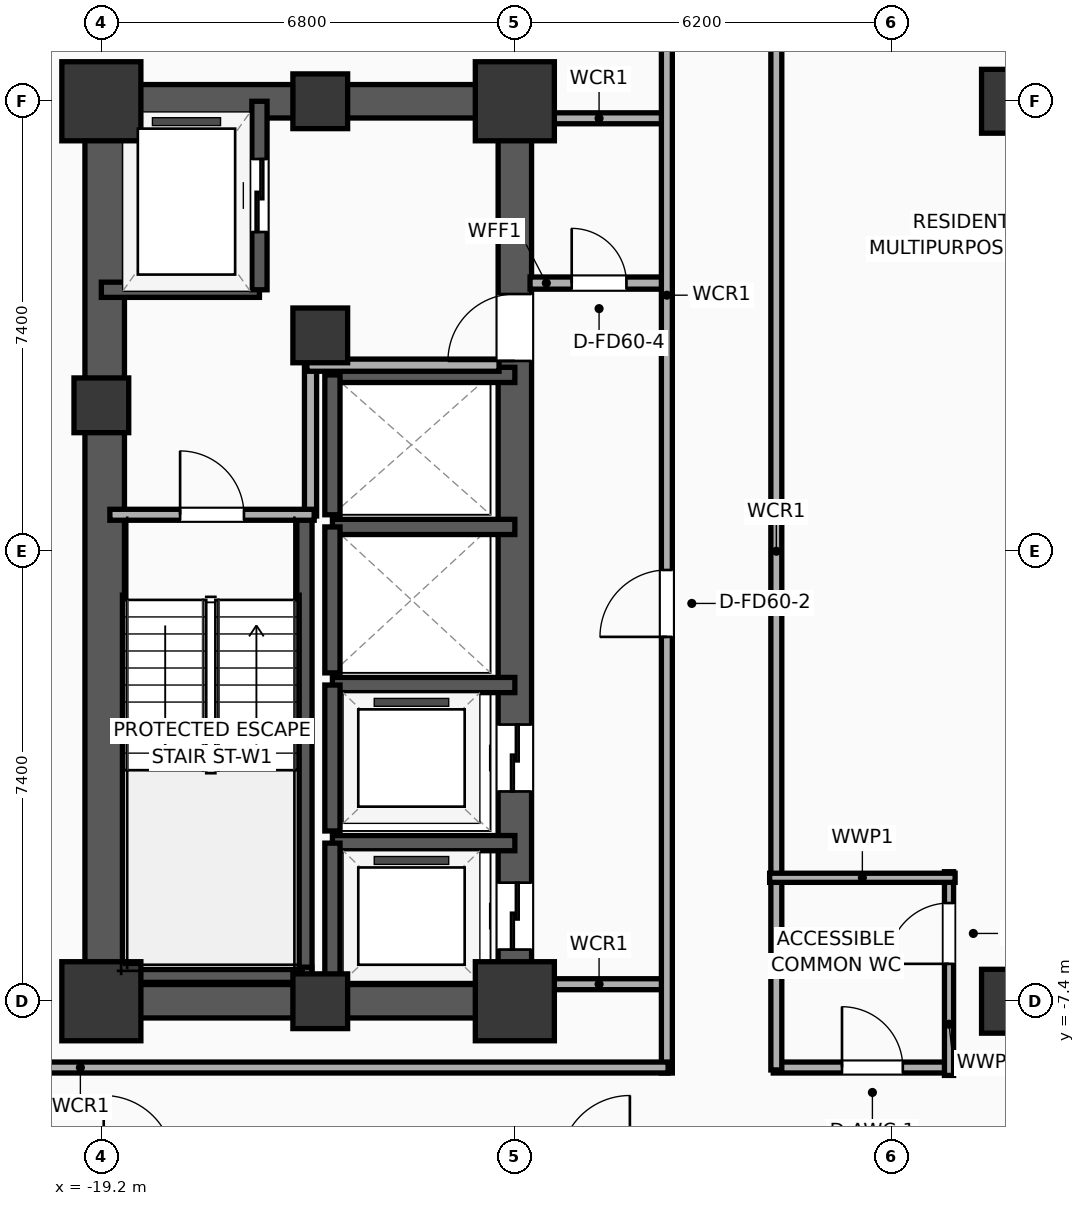
"""IFC4 building model, lengths in metres.
Left out: names, types, materials, properties, quantities, classifications, styles, units other than length and angle.
Written with IfcOpenShell. Run it as: python <this file> out.ifc"""

import sys

from ifc_helpers import new_model, si_unit, direction, frame, frame_2d, origin, origin_2d, place, context, subcontext, project, spatial, rectangle, extrude, element, fill, save


model = new_model("IFC4")
c1 = context("Model", 3, precision=1e-05, world=origin(), true_north=direction((0.0, 1.0)))
c2 = subcontext(c1, "Body", "Model", "MODEL_VIEW")
j1 = project(units=[si_unit("LENGTHUNIT", "METRE"), si_unit("PLANEANGLEUNIT", "RADIAN")], contexts=[c1])
p1 = place(None, origin())
s1 = spatial("IfcSite", under=j1, at=p1, CompositionType="ELEMENT")
p2 = place(p1, origin())
s2 = spatial("IfcBuilding", under=s1, at=p2, CompositionType="ELEMENT")
p3 = place(p2, frame((0.0, 0.0, 113.1)))
s3 = spatial("IfcBuildingStorey", under=s2, at=p3, CompositionType="ELEMENT", Elevation=113.1)
p4 = place(p3, frame((-19.2, -7.4, 0.0), z_axis=(0.0, 0.0, 1.0), x_axis=(1.0, 0.0, 0.0)))
e1 = element("IfcColumn", 1, at=p4, inside=s3, PredefinedType="COLUMN", context=c2, shape_type="SweptSolid", body=[
    extrude(rectangle(XDim=1.3, YDim=1.3, at=origin_2d()), origin(), (0.0, 0.0, 1.0), 3.9),
])
p5 = place(p3, frame((-19.2, 2.4, 0.0), z_axis=(0.0, 0.0, 1.0), x_axis=(1.0, 0.0, 0.0)))
e2 = element("IfcColumn", 2, at=p5, inside=s3, PredefinedType="COLUMN", context=c2, shape_type="SweptSolid", body=[
    extrude(rectangle(XDim=0.9, YDim=0.9, at=origin_2d()), origin(), (0.0, 0.0, 1.0), 3.9),
])
p6 = place(p3, frame((-19.2, 7.4, 0.0), z_axis=(0.0, 0.0, 1.0), x_axis=(1.0, 0.0, 0.0)))
e3 = element("IfcColumn", 3, at=p6, inside=s3, PredefinedType="COLUMN", context=c2, shape_type="SweptSolid", body=[
    extrude(rectangle(XDim=1.3, YDim=1.3, at=origin_2d()), origin(), (0.0, 0.0, 1.0), 3.9),
])
for number, where, z_axis, x_axis in (
    (4, (-15.6, -7.4, 0.0), (0.0, 0.0, 1.0), (1.0, 0.0, 0.0)),
    (5, (-15.6, 7.4, 0.0), (0.0, 0.0, 1.0), (1.0, 0.0, 0.0)),
):
    element("IfcColumn", number, at=place(p3, frame(where, z_axis=z_axis, x_axis=x_axis)), inside=s3, PredefinedType="COLUMN", context=c2, shape_type="SweptSolid", body=[
        extrude(rectangle(XDim=0.9, YDim=0.9, at=origin_2d()), origin(), (0.0, 0.0, 1.0), 3.9),
    ])
p7 = place(p3, frame((-12.4, -7.4, 0.0), z_axis=(0.0, 0.0, 1.0), x_axis=(1.0, 0.0, 0.0)))
e6 = element("IfcColumn", 6, at=p7, inside=s3, PredefinedType="COLUMN", context=c2, shape_type="SweptSolid", body=[
    extrude(rectangle(XDim=1.3, YDim=1.3, at=origin_2d()), origin(), (0.0, 0.0, 1.0), 3.9),
])
p8 = place(p3, frame((-15.6, 3.55, 0.0), z_axis=(0.0, 0.0, 1.0), x_axis=(1.0, 0.0, 0.0)))
e7 = element("IfcColumn", 7, at=p8, inside=s3, PredefinedType="COLUMN", context=c2, shape_type="SweptSolid", body=[
    extrude(rectangle(XDim=0.9, YDim=0.9, at=origin_2d()), origin(), (0.0, 0.0, 1.0), 3.9),
])
p9 = place(p3, frame((-12.4, 7.4, 0.0), z_axis=(0.0, 0.0, 1.0), x_axis=(1.0, 0.0, 0.0)))
e8 = element("IfcColumn", 8, at=p9, inside=s3, PredefinedType="COLUMN", context=c2, shape_type="SweptSolid", body=[
    extrude(rectangle(XDim=1.3, YDim=1.3, at=origin_2d()), origin(), (0.0, 0.0, 1.0), 3.9),
])
for number, where, z_axis, x_axis in (
    (9, (-19.475, -7.4, 0.0), (0.0, 0.0, 1.0), (1.0, 0.0, 0.0)),
    (10, (-19.475, 7.4, 0.0), (0.0, 0.0, 1.0), (1.0, 0.0, 0.0)),
):
    element("IfcWall", number, at=place(p3, frame(where, z_axis=z_axis, x_axis=x_axis)), inside=s3, PredefinedType="SHEAR", context=c2, shape_type="SweptSolid", body=[
        extrude(rectangle(XDim=7.35, YDim=0.55, at=frame_2d((3.675, 0.0))), origin(), (0.0, 0.0, 1.0), 3.65),
    ])
p10 = place(p3, frame((-19.145, -7.4, 0.0), z_axis=(0.0, 0.0, 1.0), x_axis=(0.0, 1.0, 0.0)))
e11 = element("IfcWall", 11, at=p10, inside=s3, PredefinedType="SHEAR", context=c2, shape_type="SweptSolid", body=[
    extrude(rectangle(XDim=14.8, YDim=0.65, at=frame_2d((7.4, 0.0))), origin(), (0.0, 0.0, 1.0), 3.65),
])
p11 = place(p3, frame((-12.4, -7.4, 0.0), z_axis=(0.0, 0.0, 1.0), x_axis=(0.0, 1.0, 0.0)))
e12 = element("IfcWall", 12, at=p11, inside=s3, PredefinedType="SHEAR", context=c2, shape_type="SweptSolid", body=[
    extrude(rectangle(XDim=14.8, YDim=0.55, at=frame_2d((7.4, 0.0))), origin(), (0.0, 0.0, 1.0), 3.65),
])
p12 = place(p11, frame((0.85, 0.0, 0.0)))
e13 = element("IfcOpeningElement", 13, at=p12, cuts=e12, PredefinedType="OPENING", context=c2, shape_type="SweptSolid", body=[
    extrude(rectangle(XDim=1.1, YDim=2.05, at=frame_2d((0.55, 1.025))), frame((0.0, 0.285, 0.0), z_axis=(0.0, -1.0, 0.0), x_axis=(1.0, 0.0, 0.0)), (0.0, 0.0, 1.0), 0.57),
])
p13 = place(p11, frame((3.45, 0.0, 0.0)))
e14 = element("IfcOpeningElement", 14, at=p13, cuts=e12, PredefinedType="OPENING", context=c2, shape_type="SweptSolid", body=[
    extrude(rectangle(XDim=1.1, YDim=2.05, at=frame_2d((0.55, 1.025))), frame((0.0, 0.285, 0.0), z_axis=(0.0, -1.0, 0.0), x_axis=(1.0, 0.0, 0.0)), (0.0, 0.0, 1.0), 0.57),
])
p14 = place(p11, frame((10.53, 0.0, 0.0)))
e15 = element("IfcOpeningElement", 15, at=p14, cuts=e12, PredefinedType="OPENING", context=c2, shape_type="SweptSolid", body=[
    extrude(rectangle(XDim=1.1, YDim=2.05, at=frame_2d((0.55, 1.025))), frame((0.0, 0.285, 0.0), z_axis=(0.0, -1.0, 0.0), x_axis=(1.0, 0.0, 0.0)), (0.0, 0.0, 1.0), 0.57),
])
p15 = place(p3, frame((-15.86, -7.085, 0.0), z_axis=(0.0, 0.0, 1.0), x_axis=(0.0, 1.0, 0.0)))
e16 = element("IfcWall", 16, at=p15, inside=s3, PredefinedType="SOLIDWALL", context=c2, shape_type="SweptSolid", body=[
    extrude(rectangle(XDim=7.685, YDim=0.25, at=frame_2d((3.843, 0.0))), origin(), (0.0, 0.0, 1.0), 3.65),
])
p16 = place(p3, frame((-19.2, -6.965, 0.0), z_axis=(0.0, 0.0, 1.0), x_axis=(1.0, 0.0, 0.0)))
e17 = element("IfcWall", 17, at=p16, inside=s3, PredefinedType="SOLIDWALL", context=c2, shape_type="SweptSolid", body=[
    extrude(rectangle(XDim=3.46, YDim=0.25, at=frame_2d((1.73, 0.0))), origin(), (0.0, 0.0, 1.0), 3.65),
])
for number, where, z_axis, x_axis in (
    (18, (-4.2, -7.4, 0.0), (0.0, 0.0, 1.0), (1.0, 0.0, 0.0)),
    (19, (-4.2, 7.4, 0.0), (0.0, 0.0, 1.0), (1.0, 0.0, 0.0)),
):
    element("IfcColumn", number, at=place(p3, frame(where, z_axis=z_axis, x_axis=x_axis)), inside=s3, PredefinedType="COLUMN", context=c2, shape_type="SweptSolid", body=[
        extrude(rectangle(XDim=1.05, YDim=1.05, at=origin_2d()), origin(), (0.0, 0.0, 1.0), 3.9),
    ])
p17 = place(p3, frame((-19.2, 4.3, 0.0), z_axis=(0.0, 0.0, 1.0), x_axis=(1.0, 0.0, 0.0)))
e20 = element("IfcWall", 20, at=p17, inside=s3, PredefinedType="SOLIDWALL", context=c2, shape_type="SweptSolid", body=[
    extrude(rectangle(XDim=2.6, YDim=0.25, at=frame_2d((1.3, 0.0))), origin(), (0.0, 0.0, 1.0), 3.65),
])
p18 = place(p3, frame((-16.6, 4.3, 0.0), z_axis=(0.0, 0.0, 1.0), x_axis=(0.0, 1.0, 0.0)))
e21 = element("IfcWall", 21, at=p18, inside=s3, PredefinedType="SOLIDWALL", context=c2, shape_type="SweptSolid", body=[
    extrude(rectangle(XDim=3.1, YDim=0.25, at=frame_2d((1.55, 0.0))), origin(), (0.0, 0.0, 1.0), 3.65),
])
p19 = place(p18, frame((0.95, 0.0, 0.0)))
e22 = element("IfcOpeningElement", 22, at=p19, cuts=e21, PredefinedType="OPENING", context=c2, shape_type="SweptSolid", body=[
    extrude(rectangle(XDim=1.2, YDim=2.05, at=frame_2d((0.6, 1.025))), frame((0.0, 0.135, 0.0), z_axis=(0.0, -1.0, 0.0), x_axis=(1.0, 0.0, 0.0)), (0.0, 0.0, 1.0), 0.27),
])
p20 = place(p3, frame((-12.4, -4.8, 0.0), z_axis=(0.0, 0.0, 1.0), x_axis=(-1.0, 0.0, 0.0)))
e23 = element("IfcWall", 23, at=p20, inside=s3, PredefinedType="SOLIDWALL", context=c2, shape_type="SweptSolid", body=[
    extrude(rectangle(XDim=3.0, YDim=0.25, at=frame_2d((1.5, 0.0))), origin(), (0.0, 0.0, 1.0), 3.65),
])
p21 = place(p3, frame((-15.4, -4.8, 0.0), z_axis=(0.0, 0.0, 1.0), x_axis=(0.0, -1.0, 0.0)))
e24 = element("IfcWall", 24, at=p21, inside=s3, PredefinedType="SOLIDWALL", context=c2, shape_type="SweptSolid", body=[
    extrude(rectangle(XDim=2.6, YDim=0.25, at=frame_2d((1.3, 0.0))), origin(), (0.0, 0.0, 1.0), 3.65),
])
p22 = place(p3, frame((-12.4, -2.2, 0.0), z_axis=(0.0, 0.0, 1.0), x_axis=(-1.0, 0.0, 0.0)))
e25 = element("IfcWall", 25, at=p22, inside=s3, PredefinedType="SOLIDWALL", context=c2, shape_type="SweptSolid", body=[
    extrude(rectangle(XDim=3.0, YDim=0.25, at=frame_2d((1.5, 0.0))), origin(), (0.0, 0.0, 1.0), 3.65),
])
p23 = place(p3, frame((-15.4, -2.2, 0.0), z_axis=(0.0, 0.0, 1.0), x_axis=(0.0, -1.0, 0.0)))
e26 = element("IfcWall", 26, at=p23, inside=s3, PredefinedType="SOLIDWALL", context=c2, shape_type="SweptSolid", body=[
    extrude(rectangle(XDim=2.4, YDim=0.25, at=frame_2d((1.2, 0.0))), origin(), (0.0, 0.0, 1.0), 3.65),
])
p24 = place(p3, frame((-12.4, 0.4, 0.0), z_axis=(0.0, 0.0, 1.0), x_axis=(-1.0, 0.0, 0.0)))
e27 = element("IfcWall", 27, at=p24, inside=s3, PredefinedType="SOLIDWALL", context=c2, shape_type="SweptSolid", body=[
    extrude(rectangle(XDim=3.0, YDim=0.25, at=frame_2d((1.5, 0.0))), origin(), (0.0, 0.0, 1.0), 3.65),
])
p25 = place(p3, frame((-15.4, 0.4, 0.0), z_axis=(0.0, 0.0, 1.0), x_axis=(0.0, -1.0, 0.0)))
e28 = element("IfcWall", 28, at=p25, inside=s3, PredefinedType="SOLIDWALL", context=c2, shape_type="SweptSolid", body=[
    extrude(rectangle(XDim=2.4, YDim=0.25, at=frame_2d((1.2, 0.0))), origin(), (0.0, 0.0, 1.0), 3.65),
])
p26 = place(p3, frame((-12.4, 2.9, 0.0), z_axis=(0.0, 0.0, 1.0), x_axis=(-1.0, 0.0, 0.0)))
e29 = element("IfcWall", 29, at=p26, inside=s3, PredefinedType="SOLIDWALL", context=c2, shape_type="SweptSolid", body=[
    extrude(rectangle(XDim=3.0, YDim=0.25, at=frame_2d((1.5, 0.0))), origin(), (0.0, 0.0, 1.0), 3.65),
])
p27 = place(p3, frame((-15.4, 2.9, 0.0), z_axis=(0.0, 0.0, 1.0), x_axis=(0.0, -1.0, 0.0)))
e30 = element("IfcWall", 30, at=p27, inside=s3, PredefinedType="SOLIDWALL", context=c2, shape_type="SweptSolid", body=[
    extrude(rectangle(XDim=2.3, YDim=0.25, at=frame_2d((1.15, 0.0))), origin(), (0.0, 0.0, 1.0), 3.65),
])
p28 = place(p3, frame((-15.76, 0.58, 0.0), z_axis=(0.0, 0.0, 1.0), x_axis=(0.0, 1.0, 0.0)))
e31 = element("IfcWall", 31, at=p28, inside=s3, PredefinedType="PARTITIONING", context=c2, shape_type="SweptSolid", body=[
    extrude(rectangle(XDim=2.52, YDim=0.2, at=frame_2d((1.26, 0.0))), origin(), (0.0, 0.0, 1.0), 3.65),
])
p29 = place(p3, frame((-15.82, 3.06, 0.0), z_axis=(0.0, 0.0, 1.0), x_axis=(1.0, 0.0, 0.0)))
e32 = element("IfcWall", 32, at=p29, inside=s3, PredefinedType="PARTITIONING", context=c2, shape_type="SweptSolid", body=[
    extrude(rectangle(XDim=3.16, YDim=0.2, at=frame_2d((1.58, 0.0))), origin(), (0.0, 0.0, 1.0), 3.65),
])
p30 = place(p3, frame((-19.06, 0.6, 0.0), z_axis=(0.0, 0.0, 1.0), x_axis=(1.0, 0.0, 0.0)))
e33 = element("IfcWall", 33, at=p30, inside=s3, PredefinedType="PARTITIONING", context=c2, shape_type="SweptSolid", body=[
    extrude(rectangle(XDim=3.36, YDim=0.18, at=frame_2d((1.68, 0.0))), origin(), (0.0, 0.0, 1.0), 3.65),
])
p31 = place(p30, frame((1.155, 0.0, 0.0)))
e34 = element("IfcOpeningElement", 34, at=p31, cuts=e33, PredefinedType="OPENING", context=c2, shape_type="SweptSolid", body=[
    extrude(rectangle(XDim=1.05, YDim=2.05, at=frame_2d((0.525, 1.025))), frame((0.0, 0.1, 0.0), z_axis=(0.0, -1.0, 0.0), x_axis=(1.0, 0.0, 0.0)), (0.0, 0.0, 1.0), 0.2),
])
p32 = place(p3, frame((-12.15, 4.41, 0.0), z_axis=(0.0, 0.0, 1.0), x_axis=(1.0, 0.0, 0.0)))
e35 = element("IfcWall", 35, at=p32, inside=s3, PredefinedType="PARTITIONING", context=c2, shape_type="SweptSolid", body=[
    extrude(rectangle(XDim=2.27, YDim=0.2, at=frame_2d((1.135, 0.0))), origin(), (0.0, 0.0, 1.0), 3.65),
])
p33 = place(p32, frame((0.685, 0.0, 0.0)))
e36 = element("IfcOpeningElement", 36, at=p33, cuts=e35, PredefinedType="OPENING", context=c2, shape_type="SweptSolid", body=[
    extrude(rectangle(XDim=0.9, YDim=2.05, at=frame_2d((0.45, 1.025))), frame((0.0, 0.11, 0.0), z_axis=(0.0, -1.0, 0.0), x_axis=(1.0, 0.0, 0.0)), (0.0, 0.0, 1.0), 0.22),
])
for number, where, z_axis, x_axis in (
    (37, (-12.15, 7.12, 0.0), (0.0, 0.0, 1.0), (1.0, 0.0, 0.0)),
    (38, (-12.15, -7.12, 0.0), (0.0, 0.0, 1.0), (1.0, 0.0, 0.0)),
):
    element("IfcWall", number, at=place(p3, frame(where, z_axis=z_axis, x_axis=x_axis)), inside=s3, PredefinedType="PARTITIONING", context=c2, shape_type="SweptSolid", body=[
        extrude(rectangle(XDim=2.27, YDim=0.18, at=frame_2d((1.135, 0.0))), origin(), (0.0, 0.0, 1.0), 3.65),
    ])
p34 = place(p3, frame((-9.9, -8.58, 0.0), z_axis=(0.0, 0.0, 1.0), x_axis=(0.0, 1.0, 0.0)))
e39 = element("IfcWall", 39, at=p34, inside=s3, PredefinedType="PARTITIONING", context=c2, shape_type="SweptSolid", body=[
    extrude(rectangle(XDim=17.16, YDim=0.18, at=frame_2d((8.58, 0.0))), origin(), (0.0, 0.0, 1.0), 3.65),
])
p35 = place(p34, frame((7.172, 0.0, 0.0)))
e40 = element("IfcOpeningElement", 40, at=p35, cuts=e39, PredefinedType="OPENING", context=c2, shape_type="SweptSolid", body=[
    extrude(rectangle(XDim=1.1, YDim=2.05, at=frame_2d((0.55, 1.025))), frame((0.0, 0.1, 0.0), z_axis=(0.0, -1.0, 0.0), x_axis=(1.0, 0.0, 0.0)), (0.0, 0.0, 1.0), 0.2),
])
p36 = place(p3, frame((-29.21, -8.49, 0.0), z_axis=(0.0, 0.0, 1.0), x_axis=(1.0, 0.0, 0.0)))
e41 = element("IfcWall", 41, at=p36, inside=s3, PredefinedType="PARTITIONING", context=c2, shape_type="SweptSolid", body=[
    extrude(rectangle(XDim=19.33, YDim=0.18, at=frame_2d((9.665, 0.0))), origin(), (0.0, 0.0, 1.0), 3.65),
])
p37 = place(p3, frame((-8.15, -8.49, 0.0), z_axis=(0.0, 0.0, 1.0), x_axis=(1.0, 0.0, 0.0)))
e42 = element("IfcWall", 42, at=p37, inside=s3, PredefinedType="PARTITIONING", context=c2, shape_type="SweptSolid", body=[
    extrude(rectangle(XDim=16.3, YDim=0.18, at=frame_2d((8.15, 0.0))), origin(), (0.0, 0.0, 1.0), 3.65),
])
p38 = place(p37, frame((1.13, 0.0, 0.0)))
e43 = element("IfcOpeningElement", 43, at=p38, cuts=e42, PredefinedType="OPENING", context=c2, shape_type="SweptSolid", body=[
    extrude(rectangle(XDim=1.0, YDim=2.05, at=frame_2d((0.5, 1.025))), frame((0.0, 0.1, 0.0), z_axis=(0.0, -1.0, 0.0), x_axis=(1.0, 0.0, 0.0)), (0.0, 0.0, 1.0), 0.2),
])
p39 = place(p37, frame((10.12, 0.0, 0.0)))
e44 = element("IfcOpeningElement", 44, at=p39, cuts=e42, PredefinedType="OPENING", context=c2, shape_type="SweptSolid", body=[
    extrude(rectangle(XDim=0.95, YDim=2.05, at=frame_2d((0.475, 1.025))), frame((0.0, 0.1, 0.0), z_axis=(0.0, -1.0, 0.0), x_axis=(1.0, 0.0, 0.0)), (0.0, 0.0, 1.0), 0.2),
])
p40 = place(p3, frame((-8.1, -8.53, 0.0), z_axis=(0.0, 0.0, 1.0), x_axis=(0.0, 1.0, 0.0)))
e45 = element("IfcWall", 45, at=p40, inside=s3, PredefinedType="PARTITIONING", context=c2, shape_type="SweptSolid", body=[
    extrude(rectangle(XDim=17.06, YDim=0.18, at=frame_2d((8.53, 0.0))), origin(), (0.0, 0.0, 1.0), 3.65),
])
p41 = place(p3, frame((-5.26, -8.62, 0.0), z_axis=(0.0, 0.0, 1.0), x_axis=(0.0, 1.0, 0.0)))
e46 = element("IfcWall", 46, at=p41, inside=s3, PredefinedType="PLUMBINGWALL", context=c2, shape_type="SweptSolid", body=[
    extrude(rectangle(XDim=3.35, YDim=0.15, at=frame_2d((1.675, 0.0))), origin(), (0.0, 0.0, 1.0), 3.65),
])
p42 = place(p41, frame((1.835, 0.0, 0.0)))
e47 = element("IfcOpeningElement", 47, at=p42, cuts=e46, PredefinedType="OPENING", context=c2, shape_type="SweptSolid", body=[
    extrude(rectangle(XDim=1.0, YDim=2.05, at=frame_2d((0.5, 1.025))), frame((0.0, 0.085, 0.0), z_axis=(0.0, -1.0, 0.0), x_axis=(1.0, 0.0, 0.0)), (0.0, 0.0, 1.0), 0.17),
])
p43 = place(p3, frame((-8.21, -5.37, 0.0), z_axis=(0.0, 0.0, 1.0), x_axis=(1.0, 0.0, 0.0)))
e48 = element("IfcWall", 48, at=p43, inside=s3, PredefinedType="PLUMBINGWALL", context=c2, shape_type="SweptSolid", body=[
    extrude(rectangle(XDim=3.05, YDim=0.15, at=frame_2d((1.525, 0.0))), origin(), (0.0, 0.0, 1.0), 3.65),
])
p44 = place(p19, origin())
e49 = element("IfcDoor", 49, at=p44, inside=s3, OperationType="SLIDING_TO_LEFT", PredefinedType="DOOR", context=c2, shape_type="SweptSolid", body=[
    extrude(rectangle(XDim=1.2, YDim=2.05, at=frame_2d((0.6, 1.025))), frame((0.0, 0.025, 0.0), z_axis=(0.0, -1.0, 0.0), x_axis=(1.0, 0.0, 0.0)), (0.0, 0.0, 1.0), 0.05),
])
fill(e22, e49)
p45 = place(p12, origin())
e50 = element("IfcDoor", 50, at=p45, inside=s3, OperationType="SLIDING_TO_LEFT", PredefinedType="DOOR", context=c2, shape_type="SweptSolid", body=[
    extrude(rectangle(XDim=1.1, YDim=2.05, at=frame_2d((0.55, 1.025))), frame((0.0, 0.025, 0.0), z_axis=(0.0, -1.0, 0.0), x_axis=(1.0, 0.0, 0.0)), (0.0, 0.0, 1.0), 0.05),
])
fill(e13, e50)
p46 = place(p13, origin())
e51 = element("IfcDoor", 51, at=p46, inside=s3, OperationType="SLIDING_TO_LEFT", PredefinedType="DOOR", context=c2, shape_type="SweptSolid", body=[
    extrude(rectangle(XDim=1.1, YDim=2.05, at=frame_2d((0.55, 1.025))), frame((0.0, 0.025, 0.0), z_axis=(0.0, -1.0, 0.0), x_axis=(1.0, 0.0, 0.0)), (0.0, 0.0, 1.0), 0.05),
])
fill(e14, e51)
p47 = place(p31, origin())
e52 = element("IfcDoor", 52, at=p47, inside=s3, OperationType="SINGLE_SWING_LEFT", PredefinedType="DOOR", context=c2, shape_type="SweptSolid", body=[
    extrude(rectangle(XDim=1.05, YDim=2.05, at=frame_2d((0.525, 1.025))), frame((0.0, 0.025, 0.0), z_axis=(0.0, -1.0, 0.0), x_axis=(1.0, 0.0, 0.0)), (0.0, 0.0, 1.0), 0.05),
])
fill(e34, e52)
p48 = place(p33, origin())
e53 = element("IfcDoor", 53, at=p48, inside=s3, OperationType="SINGLE_SWING_LEFT", PredefinedType="DOOR", context=c2, shape_type="SweptSolid", body=[
    extrude(rectangle(XDim=0.9, YDim=2.05, at=frame_2d((0.45, 1.025))), frame((0.0, 0.025, 0.0), z_axis=(0.0, -1.0, 0.0), x_axis=(1.0, 0.0, 0.0)), (0.0, 0.0, 1.0), 0.05),
])
fill(e36, e53)
p49 = place(p35, origin())
e54 = element("IfcDoor", 54, at=p49, inside=s3, OperationType="SINGLE_SWING_LEFT", PredefinedType="DOOR", context=c2, shape_type="SweptSolid", body=[
    extrude(rectangle(XDim=1.1, YDim=2.05, at=frame_2d((0.55, 1.025))), frame((0.0, 0.025, 0.0), z_axis=(0.0, -1.0, 0.0), x_axis=(1.0, 0.0, 0.0)), (0.0, 0.0, 1.0), 0.05),
])
fill(e40, e54)
p50 = place(p38, origin())
e55 = element("IfcDoor", 55, at=p50, inside=s3, OperationType="SINGLE_SWING_LEFT", PredefinedType="DOOR", context=c2, shape_type="SweptSolid", body=[
    extrude(rectangle(XDim=1.0, YDim=2.05, at=frame_2d((0.5, 1.025))), frame((0.0, 0.025, 0.0), z_axis=(0.0, -1.0, 0.0), x_axis=(1.0, 0.0, 0.0)), (0.0, 0.0, 1.0), 0.05),
])
fill(e43, e55)
p51 = place(p42, origin())
e56 = element("IfcDoor", 56, at=p51, inside=s3, OperationType="SINGLE_SWING_LEFT", PredefinedType="DOOR", context=c2, shape_type="SweptSolid", body=[
    extrude(rectangle(XDim=1.0, YDim=2.05, at=frame_2d((0.5, 1.025))), frame((0.0, 0.025, 0.0), z_axis=(0.0, -1.0, 0.0), x_axis=(1.0, 0.0, 0.0)), (0.0, 0.0, 1.0), 0.05),
])
fill(e47, e56)
p52 = place(p14, origin())
e57 = element("IfcDoor", 57, at=p52, inside=s3, OperationType="SINGLE_SWING_LEFT", PredefinedType="DOOR", context=c2, shape_type="SweptSolid", body=[
    extrude(rectangle(XDim=1.1, YDim=2.05, at=frame_2d((0.55, 1.025))), frame((0.0, 0.025, 0.0), z_axis=(0.0, -1.0, 0.0), x_axis=(1.0, 0.0, 0.0)), (0.0, 0.0, 1.0), 0.05),
])
fill(e15, e57)
save(model, sys.argv[1])
